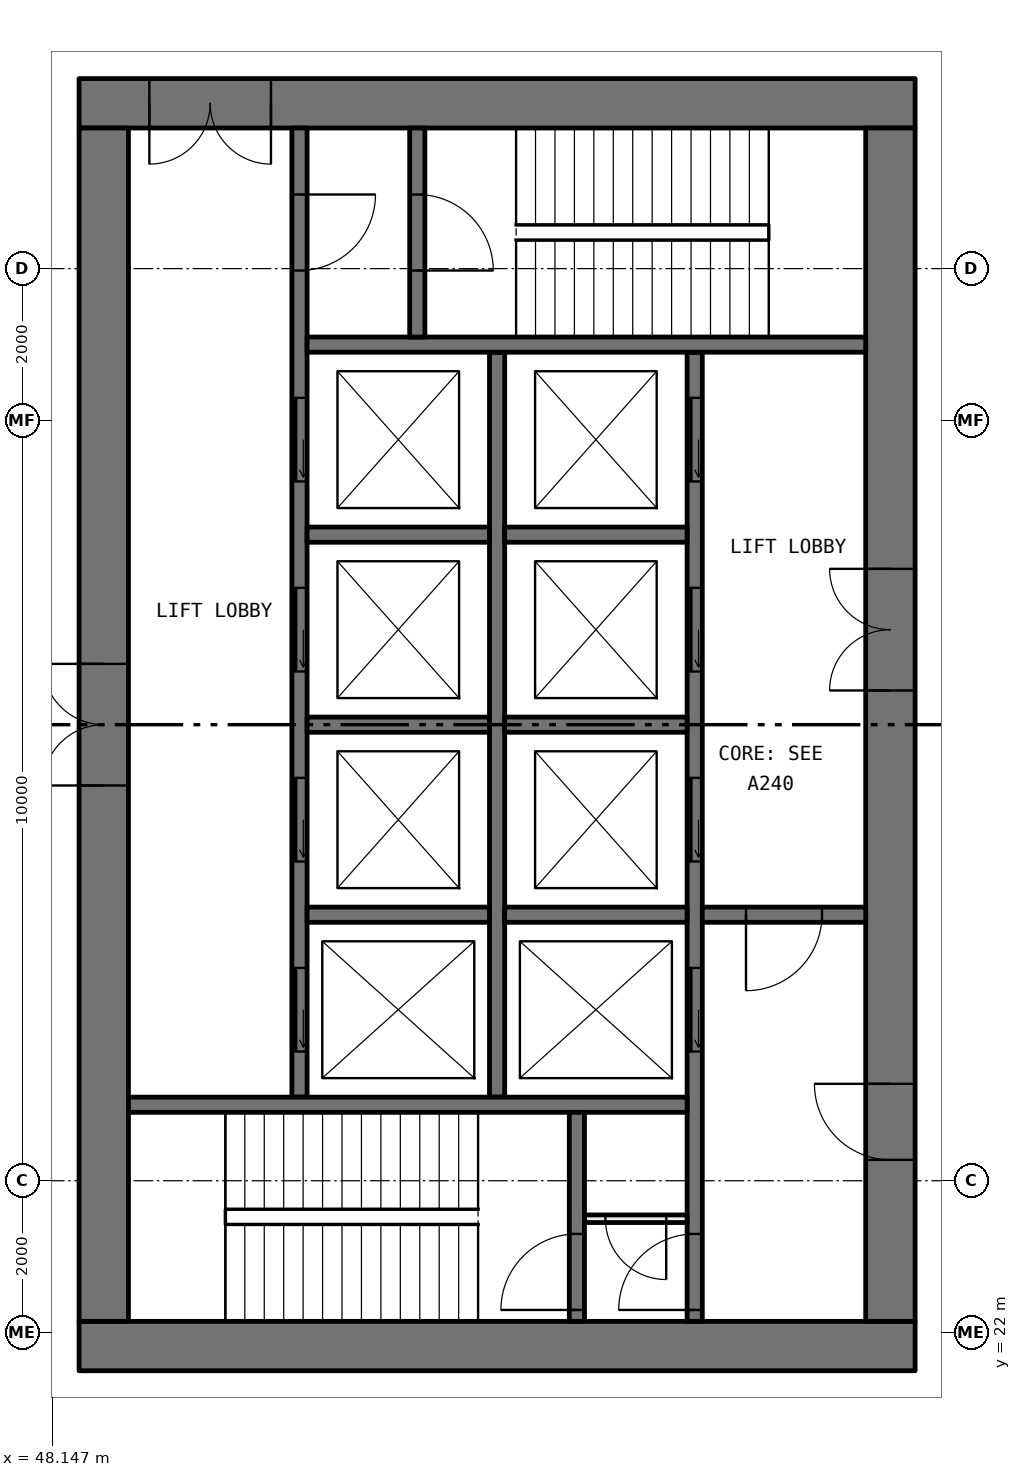
"""IFC4 building model, lengths in metres.
Left out: names, types, materials, properties, quantities, classifications, styles, units other than length and angle.
Written with IfcOpenShell. Run it as: python <this file> out.ifc"""

import sys

from ifc_helpers import new_model, si_unit, direction, frame, frame_2d, origin, place, context, subcontext, project, spatial, rectangle, extrude, element, fill, save


model = new_model("IFC4")
c1 = context("Model", 3, precision=1e-05, world=origin(), true_north=direction((0.0, 1.0)))
c2 = subcontext(c1, "Body", "Model", "MODEL_VIEW")
j1 = project(units=[si_unit("LENGTHUNIT", "METRE"), si_unit("PLANEANGLEUNIT", "RADIAN")], contexts=[c1])
p1 = place(None, origin())
s1 = spatial("IfcSite", under=j1, at=p1, CompositionType="ELEMENT")
p2 = place(p1, origin())
s2 = spatial("IfcBuilding", under=s1, at=p2, CompositionType="ELEMENT")
p3 = place(p2, frame((0.0, 0.0, 148.35)))
s3 = spatial("IfcBuildingStorey", under=s2, at=p3, CompositionType="ELEMENT", Elevation=148.35)
p4 = place(p3, frame((59.5, 21.825, 0.0), z_axis=(0.0, 0.0, 1.0), x_axis=(-1.0, 0.0, 0.0)))
e1 = element("IfcWall", 1, at=p4, inside=s3, PredefinedType="SHEAR", context=c2, shape_type="SweptSolid", body=[
    extrude(rectangle(XDim=11.0, YDim=0.65, at=frame_2d((5.5, 0.0))), origin(), (0.0, 0.0, 1.0), 5.0),
])
p5 = place(p3, frame((59.5, 38.175, 0.0), z_axis=(0.0, 0.0, 1.0), x_axis=(-1.0, 0.0, 0.0)))
e2 = element("IfcWall", 2, at=p5, inside=s3, PredefinedType="SHEAR", context=c2, shape_type="SweptSolid", body=[
    extrude(rectangle(XDim=11.0, YDim=0.65, at=frame_2d((5.5, 0.0))), origin(), (0.0, 0.0, 1.0), 5.0),
])
p6 = place(p5, frame((8.475, 0.0, 0.0)))
e3 = element("IfcOpeningElement", 3, at=p6, cuts=e2, PredefinedType="OPENING", context=c2, shape_type="SweptSolid", body=[
    extrude(rectangle(XDim=1.6, YDim=2.1, at=frame_2d((0.8, 1.05))), frame((0.0, 0.335, 0.0), z_axis=(0.0, -1.0, 0.0), x_axis=(1.0, 0.0, 0.0)), (0.0, 0.0, 1.0), 0.67),
])
p7 = place(p3, frame((59.175, 22.15, 0.0), z_axis=(0.0, 0.0, 1.0), x_axis=(0.0, 1.0, 0.0)))
e4 = element("IfcWall", 4, at=p7, inside=s3, PredefinedType="SHEAR", context=c2, shape_type="SweptSolid", body=[
    extrude(rectangle(XDim=15.7, YDim=0.65, at=frame_2d((7.85, 0.0))), origin(), (0.0, 0.0, 1.0), 5.0),
])
p8 = place(p7, frame((8.3, 0.0, 0.0)))
e5 = element("IfcOpeningElement", 5, at=p8, cuts=e4, PredefinedType="OPENING", context=c2, shape_type="SweptSolid", body=[
    extrude(rectangle(XDim=1.6, YDim=2.1, at=frame_2d((0.8, 1.05))), frame((0.0, 0.335, 0.0), z_axis=(0.0, -1.0, 0.0), x_axis=(1.0, 0.0, 0.0)), (0.0, 0.0, 1.0), 0.67),
])
p9 = place(p7, frame((2.125, 0.0, 0.0)))
e6 = element("IfcOpeningElement", 6, at=p9, cuts=e4, PredefinedType="OPENING", context=c2, shape_type="SweptSolid", body=[
    extrude(rectangle(XDim=1.0, YDim=2.1, at=frame_2d((0.5, 1.05))), frame((0.0, 0.335, 0.0), z_axis=(0.0, -1.0, 0.0), x_axis=(1.0, 0.0, 0.0)), (0.0, 0.0, 1.0), 0.67),
])
p10 = place(p3, frame((48.825, 22.15, 0.0), z_axis=(0.0, 0.0, 1.0), x_axis=(0.0, 1.0, 0.0)))
e7 = element("IfcWall", 7, at=p10, inside=s3, PredefinedType="SHEAR", context=c2, shape_type="SweptSolid", body=[
    extrude(rectangle(XDim=15.7, YDim=0.65, at=frame_2d((7.85, 0.0))), origin(), (0.0, 0.0, 1.0), 5.0),
])
p11 = place(p10, frame((7.05, 0.0, 0.0)))
e8 = element("IfcOpeningElement", 8, at=p11, cuts=e7, PredefinedType="OPENING", context=c2, shape_type="SweptSolid", body=[
    extrude(rectangle(XDim=1.6, YDim=2.1, at=frame_2d((0.8, 1.05))), frame((0.0, 0.335, 0.0), z_axis=(0.0, -1.0, 0.0), x_axis=(1.0, 0.0, 0.0)), (0.0, 0.0, 1.0), 0.67),
])
p12 = place(p3, frame((56.6, 22.15, 0.0), z_axis=(0.0, 0.0, 1.0), x_axis=(0.0, 1.0, 0.0)))
e9 = element("IfcWall", 9, at=p12, inside=s3, PredefinedType="SOLIDWALL", context=c2, shape_type="SweptSolid", body=[
    extrude(rectangle(XDim=12.75, YDim=0.2, at=frame_2d((6.375, 0.0))), origin(), (0.0, 0.0, 1.0), 5.0),
])
p13 = place(p12, frame((3.55, 0.0, 0.0)))
e10 = element("IfcOpeningElement", 10, at=p13, cuts=e9, PredefinedType="OPENING", context=c2, shape_type="SweptSolid", body=[
    extrude(rectangle(XDim=1.1, YDim=2.1, at=frame_2d((0.55, 1.05))), frame((0.0, 0.11, 0.0), z_axis=(0.0, -1.0, 0.0), x_axis=(1.0, 0.0, 0.0)), (0.0, 0.0, 1.0), 0.22),
])
p14 = place(p12, frame((6.05, 0.0, 0.0)))
e11 = element("IfcOpeningElement", 11, at=p14, cuts=e9, PredefinedType="OPENING", context=c2, shape_type="SweptSolid", body=[
    extrude(rectangle(XDim=1.1, YDim=2.1, at=frame_2d((0.55, 1.05))), frame((0.0, 0.11, 0.0), z_axis=(0.0, -1.0, 0.0), x_axis=(1.0, 0.0, 0.0)), (0.0, 0.0, 1.0), 0.22),
])
p15 = place(p12, frame((8.55, 0.0, 0.0)))
e12 = element("IfcOpeningElement", 12, at=p15, cuts=e9, PredefinedType="OPENING", context=c2, shape_type="SweptSolid", body=[
    extrude(rectangle(XDim=1.1, YDim=2.1, at=frame_2d((0.55, 1.05))), frame((0.0, 0.11, 0.0), z_axis=(0.0, -1.0, 0.0), x_axis=(1.0, 0.0, 0.0)), (0.0, 0.0, 1.0), 0.22),
])
p16 = place(p12, frame((11.05, 0.0, 0.0)))
e13 = element("IfcOpeningElement", 13, at=p16, cuts=e9, PredefinedType="OPENING", context=c2, shape_type="SweptSolid", body=[
    extrude(rectangle(XDim=1.1, YDim=2.1, at=frame_2d((0.55, 1.05))), frame((0.0, 0.11, 0.0), z_axis=(0.0, -1.0, 0.0), x_axis=(1.0, 0.0, 0.0)), (0.0, 0.0, 1.0), 0.22),
])
p17 = place(p12, frame((0.15, 0.0, 0.0)))
e14 = element("IfcOpeningElement", 14, at=p17, cuts=e9, PredefinedType="OPENING", context=c2, shape_type="SweptSolid", body=[
    extrude(rectangle(XDim=1.0, YDim=2.1, at=frame_2d((0.5, 1.05))), frame((0.0, 0.11, 0.0), z_axis=(0.0, -1.0, 0.0), x_axis=(1.0, 0.0, 0.0)), (0.0, 0.0, 1.0), 0.22),
])
p18 = place(p3, frame((51.4, 25.1, 0.0), z_axis=(0.0, 0.0, 1.0), x_axis=(0.0, 1.0, 0.0)))
e15 = element("IfcWall", 15, at=p18, inside=s3, PredefinedType="SOLIDWALL", context=c2, shape_type="SweptSolid", body=[
    extrude(rectangle(XDim=12.75, YDim=0.2, at=frame_2d((6.375, 0.0))), origin(), (0.0, 0.0, 1.0), 5.0),
])
p19 = place(p18, frame((0.6, 0.0, 0.0)))
e16 = element("IfcOpeningElement", 16, at=p19, cuts=e15, PredefinedType="OPENING", context=c2, shape_type="SweptSolid", body=[
    extrude(rectangle(XDim=1.1, YDim=2.1, at=frame_2d((0.55, 1.05))), frame((0.0, 0.11, 0.0), z_axis=(0.0, -1.0, 0.0), x_axis=(1.0, 0.0, 0.0)), (0.0, 0.0, 1.0), 0.22),
])
p20 = place(p18, frame((3.1, 0.0, 0.0)))
e17 = element("IfcOpeningElement", 17, at=p20, cuts=e15, PredefinedType="OPENING", context=c2, shape_type="SweptSolid", body=[
    extrude(rectangle(XDim=1.1, YDim=2.1, at=frame_2d((0.55, 1.05))), frame((0.0, 0.11, 0.0), z_axis=(0.0, -1.0, 0.0), x_axis=(1.0, 0.0, 0.0)), (0.0, 0.0, 1.0), 0.22),
])
p21 = place(p18, frame((5.6, 0.0, 0.0)))
e18 = element("IfcOpeningElement", 18, at=p21, cuts=e15, PredefinedType="OPENING", context=c2, shape_type="SweptSolid", body=[
    extrude(rectangle(XDim=1.1, YDim=2.1, at=frame_2d((0.55, 1.05))), frame((0.0, 0.11, 0.0), z_axis=(0.0, -1.0, 0.0), x_axis=(1.0, 0.0, 0.0)), (0.0, 0.0, 1.0), 0.22),
])
p22 = place(p18, frame((8.1, 0.0, 0.0)))
e19 = element("IfcOpeningElement", 19, at=p22, cuts=e15, PredefinedType="OPENING", context=c2, shape_type="SweptSolid", body=[
    extrude(rectangle(XDim=1.1, YDim=2.1, at=frame_2d((0.55, 1.05))), frame((0.0, 0.11, 0.0), z_axis=(0.0, -1.0, 0.0), x_axis=(1.0, 0.0, 0.0)), (0.0, 0.0, 1.0), 0.22),
])
p23 = place(p18, frame((10.875, 0.0, 0.0)))
e20 = element("IfcOpeningElement", 20, at=p23, cuts=e15, PredefinedType="OPENING", context=c2, shape_type="SweptSolid", body=[
    extrude(rectangle(XDim=1.0, YDim=2.1, at=frame_2d((0.5, 1.05))), frame((0.0, 0.11, 0.0), z_axis=(0.0, -1.0, 0.0), x_axis=(1.0, 0.0, 0.0)), (0.0, 0.0, 1.0), 0.22),
])
p24 = place(p3, frame((54.0, 25.1, 0.0), z_axis=(0.0, 0.0, 1.0), x_axis=(0.0, 1.0, 0.0)))
e21 = element("IfcWall", 21, at=p24, inside=s3, PredefinedType="SOLIDWALL", context=c2, shape_type="SweptSolid", body=[
    extrude(rectangle(XDim=9.8, YDim=0.2, at=frame_2d((4.9, 0.0))), origin(), (0.0, 0.0, 1.0), 5.0),
])
for number, where, z_axis, x_axis in (
    (22, (56.5, 25.0, 0.0), (0.0, 0.0, 1.0), (-1.0, 0.0, 0.0)),
    (23, (58.85, 35.0, 0.0), (0.0, 0.0, 1.0), (-1.0, 0.0, 0.0)),
):
    element("IfcWall", number, at=place(p3, frame(where, z_axis=z_axis, x_axis=x_axis)), inside=s3, PredefinedType="SOLIDWALL", context=c2, shape_type="SweptSolid", body=[
        extrude(rectangle(XDim=7.35, YDim=0.2, at=frame_2d((3.675, 0.0))), origin(), (0.0, 0.0, 1.0), 5.0),
    ])
p25 = place(p3, frame((58.85, 27.5, 0.0), z_axis=(0.0, 0.0, 1.0), x_axis=(-1.0, 0.0, 0.0)))
e24 = element("IfcWall", 24, at=p25, inside=s3, PredefinedType="SOLIDWALL", context=c2, shape_type="SweptSolid", body=[
    extrude(rectangle(XDim=2.15, YDim=0.2, at=frame_2d((1.075, 0.0))), origin(), (0.0, 0.0, 1.0), 5.0),
])
p26 = place(p25, frame((0.575, 0.0, 0.0)))
e25 = element("IfcOpeningElement", 25, at=p26, cuts=e24, PredefinedType="OPENING", context=c2, shape_type="SweptSolid", body=[
    extrude(rectangle(XDim=1.0, YDim=2.1, at=frame_2d((0.5, 1.05))), frame((0.0, 0.11, 0.0), z_axis=(0.0, -1.0, 0.0), x_axis=(1.0, 0.0, 0.0)), (0.0, 0.0, 1.0), 0.22),
])
p27 = place(p3, frame((55.05, 22.15, 0.0), z_axis=(0.0, 0.0, 1.0), x_axis=(0.0, 1.0, 0.0)))
e26 = element("IfcWall", 26, at=p27, inside=s3, PredefinedType="SOLIDWALL", context=c2, shape_type="SweptSolid", body=[
    extrude(rectangle(XDim=2.75, YDim=0.2, at=frame_2d((1.375, 0.0))), origin(), (0.0, 0.0, 1.0), 5.0),
])
p28 = place(p27, frame((0.15, 0.0, 0.0)))
e27 = element("IfcOpeningElement", 27, at=p28, cuts=e26, PredefinedType="OPENING", context=c2, shape_type="SweptSolid", body=[
    extrude(rectangle(XDim=1.0, YDim=2.1, at=frame_2d((0.5, 1.05))), frame((0.0, 0.11, 0.0), z_axis=(0.0, -1.0, 0.0), x_axis=(1.0, 0.0, 0.0)), (0.0, 0.0, 1.0), 0.22),
])
p29 = place(p3, frame((52.95, 35.1, 0.0), z_axis=(0.0, 0.0, 1.0), x_axis=(0.0, 1.0, 0.0)))
e28 = element("IfcWall", 28, at=p29, inside=s3, PredefinedType="SOLIDWALL", context=c2, shape_type="SweptSolid", body=[
    extrude(rectangle(XDim=2.75, YDim=0.2, at=frame_2d((1.375, 0.0))), origin(), (0.0, 0.0, 1.0), 5.0),
])
p30 = place(p29, frame((0.875, 0.0, 0.0)))
e29 = element("IfcOpeningElement", 29, at=p30, cuts=e28, PredefinedType="OPENING", context=c2, shape_type="SweptSolid", body=[
    extrude(rectangle(XDim=1.0, YDim=2.1, at=frame_2d((0.5, 1.05))), frame((0.0, 0.11, 0.0), z_axis=(0.0, -1.0, 0.0), x_axis=(1.0, 0.0, 0.0)), (0.0, 0.0, 1.0), 0.22),
])
for number, where, z_axis, x_axis in (
    (30, (56.5, 27.5, 0.0), (0.0, 0.0, 1.0), (-1.0, 0.0, 0.0)),
    (31, (56.5, 30.0, 0.0), (0.0, 0.0, 1.0), (-1.0, 0.0, 0.0)),
    (32, (56.5, 32.5, 0.0), (0.0, 0.0, 1.0), (-1.0, 0.0, 0.0)),
    (33, (53.9, 27.5, 0.0), (0.0, 0.0, 1.0), (-1.0, 0.0, 0.0)),
    (34, (53.9, 30.0, 0.0), (0.0, 0.0, 1.0), (-1.0, 0.0, 0.0)),
    (35, (53.9, 32.5, 0.0), (0.0, 0.0, 1.0), (-1.0, 0.0, 0.0)),
):
    element("IfcWall", number, at=place(p3, frame(where, z_axis=z_axis, x_axis=x_axis)), inside=s3, PredefinedType="SOLIDWALL", context=c2, shape_type="SweptSolid", body=[
        extrude(rectangle(XDim=2.4, YDim=0.2, at=frame_2d((1.2, 0.0))), origin(), (0.0, 0.0, 1.0), 5.0),
    ])
p31 = place(p3, frame((56.5, 23.5, 0.0), z_axis=(0.0, 0.0, 1.0), x_axis=(-1.0, 0.0, 0.0)))
e36 = element("IfcWall", 36, at=p31, inside=s3, PredefinedType="PARTITIONING", context=c2, shape_type="SweptSolid", body=[
    extrude(rectangle(XDim=1.35, YDim=0.1, at=frame_2d((0.675, 0.0))), origin(), (0.0, 0.0, 1.0), 5.0),
])
p32 = place(p31, frame((0.275, 0.0, 0.0)))
e37 = element("IfcOpeningElement", 37, at=p32, cuts=e36, PredefinedType="OPENING", context=c2, shape_type="SweptSolid", body=[
    extrude(rectangle(XDim=0.8, YDim=2.1, at=frame_2d((0.4, 1.05))), frame((0.0, 0.06, 0.0), z_axis=(0.0, -1.0, 0.0), x_axis=(1.0, 0.0, 0.0)), (0.0, 0.0, 1.0), 0.12),
])
p33 = place(p19, origin())
e38 = element("IfcDoor", 38, at=p33, inside=s3, OperationType="SLIDING_TO_LEFT", PredefinedType="DOOR", context=c2, shape_type="SweptSolid", body=[
    extrude(rectangle(XDim=1.1, YDim=2.1, at=frame_2d((0.55, 1.05))), frame((0.0, 0.025, 0.0), z_axis=(0.0, -1.0, 0.0), x_axis=(1.0, 0.0, 0.0)), (0.0, 0.0, 1.0), 0.05),
])
fill(e16, e38)
p34 = place(p20, origin())
e39 = element("IfcDoor", 39, at=p34, inside=s3, OperationType="SLIDING_TO_LEFT", PredefinedType="DOOR", context=c2, shape_type="SweptSolid", body=[
    extrude(rectangle(XDim=1.1, YDim=2.1, at=frame_2d((0.55, 1.05))), frame((0.0, 0.025, 0.0), z_axis=(0.0, -1.0, 0.0), x_axis=(1.0, 0.0, 0.0)), (0.0, 0.0, 1.0), 0.05),
])
fill(e17, e39)
p35 = place(p21, origin())
e40 = element("IfcDoor", 40, at=p35, inside=s3, OperationType="SLIDING_TO_LEFT", PredefinedType="DOOR", context=c2, shape_type="SweptSolid", body=[
    extrude(rectangle(XDim=1.1, YDim=2.1, at=frame_2d((0.55, 1.05))), frame((0.0, 0.025, 0.0), z_axis=(0.0, -1.0, 0.0), x_axis=(1.0, 0.0, 0.0)), (0.0, 0.0, 1.0), 0.05),
])
fill(e18, e40)
p36 = place(p22, origin())
e41 = element("IfcDoor", 41, at=p36, inside=s3, OperationType="SLIDING_TO_LEFT", PredefinedType="DOOR", context=c2, shape_type="SweptSolid", body=[
    extrude(rectangle(XDim=1.1, YDim=2.1, at=frame_2d((0.55, 1.05))), frame((0.0, 0.025, 0.0), z_axis=(0.0, -1.0, 0.0), x_axis=(1.0, 0.0, 0.0)), (0.0, 0.0, 1.0), 0.05),
])
fill(e19, e41)
p37 = place(p13, origin())
e42 = element("IfcDoor", 42, at=p37, inside=s3, OperationType="SLIDING_TO_LEFT", PredefinedType="DOOR", context=c2, shape_type="SweptSolid", body=[
    extrude(rectangle(XDim=1.1, YDim=2.1, at=frame_2d((0.55, 1.05))), frame((0.0, 0.025, 0.0), z_axis=(0.0, -1.0, 0.0), x_axis=(1.0, 0.0, 0.0)), (0.0, 0.0, 1.0), 0.05),
])
fill(e10, e42)
p38 = place(p14, origin())
e43 = element("IfcDoor", 43, at=p38, inside=s3, OperationType="SLIDING_TO_LEFT", PredefinedType="DOOR", context=c2, shape_type="SweptSolid", body=[
    extrude(rectangle(XDim=1.1, YDim=2.1, at=frame_2d((0.55, 1.05))), frame((0.0, 0.025, 0.0), z_axis=(0.0, -1.0, 0.0), x_axis=(1.0, 0.0, 0.0)), (0.0, 0.0, 1.0), 0.05),
])
fill(e11, e43)
p39 = place(p15, origin())
e44 = element("IfcDoor", 44, at=p39, inside=s3, OperationType="SLIDING_TO_LEFT", PredefinedType="DOOR", context=c2, shape_type="SweptSolid", body=[
    extrude(rectangle(XDim=1.1, YDim=2.1, at=frame_2d((0.55, 1.05))), frame((0.0, 0.025, 0.0), z_axis=(0.0, -1.0, 0.0), x_axis=(1.0, 0.0, 0.0)), (0.0, 0.0, 1.0), 0.05),
])
fill(e12, e44)
p40 = place(p16, origin())
e45 = element("IfcDoor", 45, at=p40, inside=s3, OperationType="SLIDING_TO_LEFT", PredefinedType="DOOR", context=c2, shape_type="SweptSolid", body=[
    extrude(rectangle(XDim=1.1, YDim=2.1, at=frame_2d((0.55, 1.05))), frame((0.0, 0.025, 0.0), z_axis=(0.0, -1.0, 0.0), x_axis=(1.0, 0.0, 0.0)), (0.0, 0.0, 1.0), 0.05),
])
fill(e13, e45)
p41 = place(p28, origin())
e46 = element("IfcDoor", 46, at=p41, inside=s3, OperationType="SINGLE_SWING_RIGHT", PredefinedType="DOOR", context=c2, shape_type="SweptSolid", body=[
    extrude(rectangle(XDim=1.0, YDim=2.1, at=frame_2d((0.5, 1.05))), frame((0.0, 0.025, 0.0), z_axis=(0.0, -1.0, 0.0), x_axis=(1.0, 0.0, 0.0)), (0.0, 0.0, 1.0), 0.05),
])
fill(e27, e46)
p42 = place(p17, origin())
e47 = element("IfcDoor", 47, at=p42, inside=s3, OperationType="SINGLE_SWING_RIGHT", PredefinedType="DOOR", context=c2, shape_type="SweptSolid", body=[
    extrude(rectangle(XDim=1.0, YDim=2.1, at=frame_2d((0.5, 1.05))), frame((0.0, 0.025, 0.0), z_axis=(0.0, -1.0, 0.0), x_axis=(1.0, 0.0, 0.0)), (0.0, 0.0, 1.0), 0.05),
])
fill(e14, e47)
p43 = place(p23, frame((1.0, 0.0, 0.0), x_axis=(-1.0, 0.0, 0.0)))
e48 = element("IfcDoor", 48, at=p43, inside=s3, OperationType="SINGLE_SWING_RIGHT", PredefinedType="DOOR", context=c2, shape_type="SweptSolid", body=[
    extrude(rectangle(XDim=1.0, YDim=2.1, at=frame_2d((0.5, 1.05))), frame((0.0, 0.025, 0.0), z_axis=(0.0, -1.0, 0.0), x_axis=(1.0, 0.0, 0.0)), (0.0, 0.0, 1.0), 0.05),
])
fill(e20, e48)
p44 = place(p30, frame((1.0, 0.0, 0.0), x_axis=(-1.0, 0.0, 0.0)))
e49 = element("IfcDoor", 49, at=p44, inside=s3, OperationType="SINGLE_SWING_LEFT", PredefinedType="DOOR", context=c2, shape_type="SweptSolid", body=[
    extrude(rectangle(XDim=1.0, YDim=2.1, at=frame_2d((0.5, 1.05))), frame((0.0, 0.025, 0.0), z_axis=(0.0, -1.0, 0.0), x_axis=(1.0, 0.0, 0.0)), (0.0, 0.0, 1.0), 0.05),
])
fill(e29, e49)
p45 = place(p26, origin())
e50 = element("IfcDoor", 50, at=p45, inside=s3, OperationType="SINGLE_SWING_LEFT", PredefinedType="DOOR", context=c2, shape_type="SweptSolid", body=[
    extrude(rectangle(XDim=1.0, YDim=2.1, at=frame_2d((0.5, 1.05))), frame((0.0, 0.025, 0.0), z_axis=(0.0, -1.0, 0.0), x_axis=(1.0, 0.0, 0.0)), (0.0, 0.0, 1.0), 0.05),
])
fill(e25, e50)
p46 = place(p32, origin())
e51 = element("IfcDoor", 51, at=p46, inside=s3, OperationType="SINGLE_SWING_RIGHT", PredefinedType="DOOR", context=c2, shape_type="SweptSolid", body=[
    extrude(rectangle(XDim=0.8, YDim=2.1, at=frame_2d((0.4, 1.05))), frame((0.0, 0.025, 0.0), z_axis=(0.0, -1.0, 0.0), x_axis=(1.0, 0.0, 0.0)), (0.0, 0.0, 1.0), 0.05),
])
fill(e37, e51)
p47 = place(p8, origin())
e52 = element("IfcDoor", 52, at=p47, inside=s3, OperationType="DOUBLE_DOOR_SINGLE_SWING", PredefinedType="DOOR", context=c2, shape_type="SweptSolid", body=[
    extrude(rectangle(XDim=1.6, YDim=2.1, at=frame_2d((0.8, 1.05))), frame((0.0, 0.025, 0.0), z_axis=(0.0, -1.0, 0.0), x_axis=(1.0, 0.0, 0.0)), (0.0, 0.0, 1.0), 0.05),
])
fill(e5, e52)
p48 = place(p9, origin())
e53 = element("IfcDoor", 53, at=p48, inside=s3, OperationType="SINGLE_SWING_LEFT", PredefinedType="DOOR", context=c2, shape_type="SweptSolid", body=[
    extrude(rectangle(XDim=1.0, YDim=2.1, at=frame_2d((0.5, 1.05))), frame((0.0, 0.025, 0.0), z_axis=(0.0, -1.0, 0.0), x_axis=(1.0, 0.0, 0.0)), (0.0, 0.0, 1.0), 0.05),
])
fill(e6, e53)
p49 = place(p6, origin())
e54 = element("IfcDoor", 54, at=p49, inside=s3, OperationType="DOUBLE_DOOR_SINGLE_SWING", PredefinedType="DOOR", context=c2, shape_type="SweptSolid", body=[
    extrude(rectangle(XDim=1.6, YDim=2.1, at=frame_2d((0.8, 1.05))), frame((0.0, 0.025, 0.0), z_axis=(0.0, -1.0, 0.0), x_axis=(1.0, 0.0, 0.0)), (0.0, 0.0, 1.0), 0.05),
])
fill(e3, e54)
p50 = place(p11, origin())
e55 = element("IfcDoor", 55, at=p50, inside=s3, OperationType="DOUBLE_DOOR_SINGLE_SWING", PredefinedType="DOOR", context=c2, shape_type="SweptSolid", body=[
    extrude(rectangle(XDim=1.6, YDim=2.1, at=frame_2d((0.8, 1.05))), frame((0.0, 0.025, 0.0), z_axis=(0.0, -1.0, 0.0), x_axis=(1.0, 0.0, 0.0)), (0.0, 0.0, 1.0), 0.05),
])
fill(e8, e55)
save(model, sys.argv[1])
